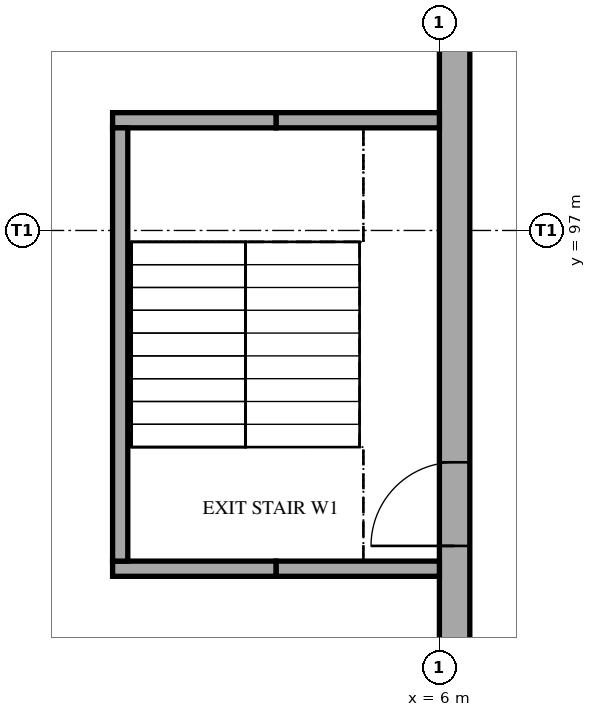
"""IFC4 building model, lengths in metres.
Left out: names, types, materials, properties, quantities, classifications, styles, units other than length and angle.
Written with IfcOpenShell. Run it as: python <this file> out.ifc"""

import sys

from ifc_helpers import new_model, si_unit, direction, frame, frame_2d, origin, place, context, subcontext, project, spatial, rectangle, extrude, element, fill, save


model = new_model("IFC4")
c1 = context("Model", 3, precision=1e-05, world=origin(), true_north=direction((0.0, 1.0)))
c2 = subcontext(c1, "Body", "Model", "MODEL_VIEW")
j1 = project(units=[si_unit("LENGTHUNIT", "METRE"), si_unit("PLANEANGLEUNIT", "RADIAN")], contexts=[c1])
p1 = place(None, origin())
s1 = spatial("IfcSite", under=j1, at=p1, CompositionType="ELEMENT")
p2 = place(p1, origin())
s2 = spatial("IfcBuilding", under=s1, at=p2, CompositionType="ELEMENT")
p3 = place(p2, frame((0.0, 0.0, -4.2)))
s3 = spatial("IfcBuildingStorey", under=s2, at=p3, CompositionType="ELEMENT", Elevation=-4.2)
p4 = place(p3, frame((6.2, 91.5, 0.0), z_axis=(0.0, 0.0, 1.0), x_axis=(0.0, 1.0, 0.0)))
e1 = element("IfcWall", 1, at=p4, inside=s3, PredefinedType="SOLIDWALL", context=c2, shape_type="SweptSolid", body=[
    extrude(rectangle(XDim=8.0, YDim=0.4, at=frame_2d((4.0, 0.0))), origin(), (0.0, 0.0, 1.0), 4.2),
])
p5 = place(p4, frame((1.35, 0.0, 0.0)))
e2 = element("IfcOpeningElement", 2, at=p5, cuts=e1, PredefinedType="OPENING", context=c2, shape_type="SweptSolid", body=[
    extrude(rectangle(XDim=1.1, YDim=2.1, at=frame_2d((0.55, 1.05))), frame((0.0, 0.21, 0.0), z_axis=(0.0, -1.0, 0.0), x_axis=(1.0, 0.0, 0.0)), (0.0, 0.0, 1.0), 0.42),
])
p6 = place(p3, frame((6.0, 98.45, 0.0), z_axis=(0.0, 0.0, 1.0), x_axis=(-1.0, 0.0, 0.0)))
e3 = element("IfcWall", 3, at=p6, inside=s3, PredefinedType="SOLIDWALL", context=c2, shape_type="SweptSolid", body=[
    extrude(rectangle(XDim=2.15, YDim=0.2, at=frame_2d((1.075, 0.0))), origin(), (0.0, 0.0, 1.0), 4.2),
])
p7 = place(p3, frame((3.85, 98.45, 0.0), z_axis=(0.0, 0.0, 1.0), x_axis=(-1.0, 0.0, 0.0)))
e4 = element("IfcWall", 4, at=p7, inside=s3, PredefinedType="SOLIDWALL", context=c2, shape_type="SweptSolid", body=[
    extrude(rectangle(XDim=2.15, YDim=0.2, at=frame_2d((1.075, 0.0))), origin(), (0.0, 0.0, 1.0), 4.2),
])
p8 = place(p3, frame((6.0, 92.55, 0.0), z_axis=(0.0, 0.0, 1.0), x_axis=(-1.0, 0.0, 0.0)))
e5 = element("IfcWall", 5, at=p8, inside=s3, PredefinedType="SOLIDWALL", context=c2, shape_type="SweptSolid", body=[
    extrude(rectangle(XDim=2.15, YDim=0.2, at=frame_2d((1.075, 0.0))), origin(), (0.0, 0.0, 1.0), 4.2),
])
p9 = place(p3, frame((3.85, 92.55, 0.0), z_axis=(0.0, 0.0, 1.0), x_axis=(-1.0, 0.0, 0.0)))
e6 = element("IfcWall", 6, at=p9, inside=s3, PredefinedType="SOLIDWALL", context=c2, shape_type="SweptSolid", body=[
    extrude(rectangle(XDim=2.15, YDim=0.2, at=frame_2d((1.075, 0.0))), origin(), (0.0, 0.0, 1.0), 4.2),
])
p10 = place(p3, frame((1.8, 98.35, 0.0), z_axis=(0.0, 0.0, 1.0), x_axis=(0.0, -1.0, 0.0)))
e7 = element("IfcWall", 7, at=p10, inside=s3, PredefinedType="SOLIDWALL", context=c2, shape_type="SweptSolid", body=[
    extrude(rectangle(XDim=5.7, YDim=0.2, at=frame_2d((2.85, 0.0))), origin(), (0.0, 0.0, 1.0), 4.2),
])
p11 = place(p5, origin())
e8 = element("IfcDoor", 8, at=p11, inside=s3, OperationType="SINGLE_SWING_LEFT", PredefinedType="DOOR", context=c2, shape_type="SweptSolid", body=[
    extrude(rectangle(XDim=1.1, YDim=2.1, at=frame_2d((0.55, 1.05))), frame((0.0, 0.025, 0.0), z_axis=(0.0, -1.0, 0.0), x_axis=(1.0, 0.0, 0.0)), (0.0, 0.0, 1.0), 0.05),
])
fill(e2, e8)
save(model, sys.argv[1])
